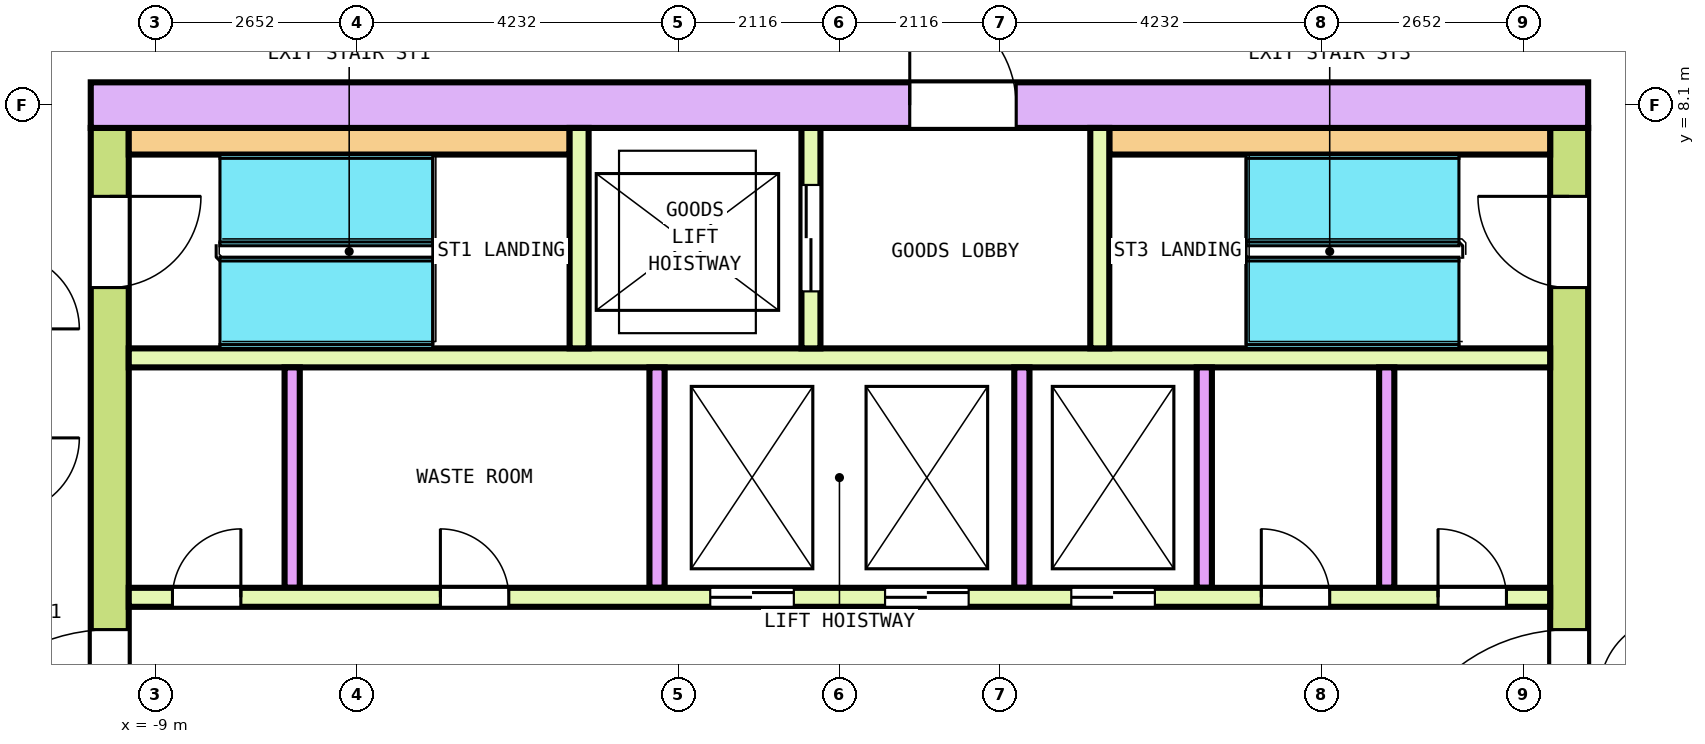
"""IFC4 building model, lengths in metres.
Left out: names, types, materials, properties, quantities, classifications, styles, units other than length and angle.
Written with IfcOpenShell. Run it as: python <this file> out.ifc"""

import sys

from ifc_helpers import new_model, si_unit, direction, frame, frame_2d, origin, place, context, subcontext, project, spatial, rectangle, extrude, element, fill, save


model = new_model("IFC4")
c1 = context("Model", 3, precision=1e-05, world=origin(), true_north=direction((0.0, 1.0)))
c2 = subcontext(c1, "Body", "Model", "MODEL_VIEW")
j1 = project(units=[si_unit("LENGTHUNIT", "METRE"), si_unit("PLANEANGLEUNIT", "RADIAN")], contexts=[c1])
p1 = place(None, origin())
s1 = spatial("IfcSite", under=j1, at=p1, CompositionType="ELEMENT")
p2 = place(p1, origin())
s2 = spatial("IfcBuilding", under=s1, at=p2, CompositionType="ELEMENT")
p3 = place(p2, frame((0.0, 0.0, 253.4)))
s3 = spatial("IfcBuildingStorey", under=s2, at=p3, CompositionType="ELEMENT", Elevation=253.4)
p4 = place(p3, frame((-9.85, 8.1, 0.0), z_axis=(0.0, 0.0, 1.0), x_axis=(1.0, 0.0, 0.0)))
e1 = element("IfcWall", 1, at=p4, inside=s3, PredefinedType="SHEAR", context=c2, shape_type="SweptSolid", body=[
    extrude(rectangle(XDim=19.7, YDim=0.6, at=frame_2d((9.85, 0.0))), origin(), (0.0, 0.0, 1.0), 3.7),
])
p5 = place(p4, frame((10.775, 0.0, 0.0)))
e2 = element("IfcOpeningElement", 2, at=p5, cuts=e1, PredefinedType="OPENING", context=c2, shape_type="SweptSolid", body=[
    extrude(rectangle(XDim=1.4, YDim=2.1, at=frame_2d((0.7, 1.05))), frame((0.0, 0.31, 0.0), z_axis=(0.0, -1.0, 0.0), x_axis=(1.0, 0.0, 0.0)), (0.0, 0.0, 1.0), 0.62),
])
p6 = place(p3, frame((-9.6, -7.8, 0.0), z_axis=(0.0, 0.0, 1.0), x_axis=(0.0, 1.0, 0.0)))
e3 = element("IfcWall", 3, at=p6, inside=s3, PredefinedType="SHEAR", context=c2, shape_type="SweptSolid", body=[
    extrude(rectangle(XDim=15.6, YDim=0.5, at=frame_2d((7.8, 0.0))), origin(), (0.0, 0.0, 1.0), 3.7),
])
p7 = place(p6, frame((6.6, 0.0, 0.0)))
e4 = element("IfcOpeningElement", 4, at=p7, cuts=e3, PredefinedType="OPENING", context=c2, shape_type="SweptSolid", body=[
    extrude(rectangle(XDim=2.4, YDim=2.1, at=frame_2d((1.2, 1.05))), frame((0.0, 0.26, 0.0), z_axis=(0.0, -1.0, 0.0), x_axis=(1.0, 0.0, 0.0)), (0.0, 0.0, 1.0), 0.52),
])
p8 = place(p6, frame((13.5, 0.0, 0.0)))
e5 = element("IfcOpeningElement", 5, at=p8, cuts=e3, PredefinedType="OPENING", context=c2, shape_type="SweptSolid", body=[
    extrude(rectangle(XDim=1.2, YDim=2.1, at=frame_2d((0.6, 1.05))), frame((0.0, 0.26, 0.0), z_axis=(0.0, -1.0, 0.0), x_axis=(1.0, 0.0, 0.0)), (0.0, 0.0, 1.0), 0.52),
])
p9 = place(p6, frame((0.9, 0.0, 0.0)))
e6 = element("IfcOpeningElement", 6, at=p9, cuts=e3, PredefinedType="OPENING", context=c2, shape_type="SweptSolid", body=[
    extrude(rectangle(XDim=1.2, YDim=2.1, at=frame_2d((0.6, 1.05))), frame((0.0, 0.26, 0.0), z_axis=(0.0, -1.0, 0.0), x_axis=(1.0, 0.0, 0.0)), (0.0, 0.0, 1.0), 0.52),
])
p10 = place(p3, frame((9.6, -7.8, 0.0), z_axis=(0.0, 0.0, 1.0), x_axis=(0.0, 1.0, 0.0)))
e7 = element("IfcWall", 7, at=p10, inside=s3, PredefinedType="SHEAR", context=c2, shape_type="SweptSolid", body=[
    extrude(rectangle(XDim=15.6, YDim=0.5, at=frame_2d((7.8, 0.0))), origin(), (0.0, 0.0, 1.0), 3.7),
])
p11 = place(p10, frame((6.6, 0.0, 0.0)))
e8 = element("IfcOpeningElement", 8, at=p11, cuts=e7, PredefinedType="OPENING", context=c2, shape_type="SweptSolid", body=[
    extrude(rectangle(XDim=2.4, YDim=2.1, at=frame_2d((1.2, 1.05))), frame((0.0, 0.26, 0.0), z_axis=(0.0, -1.0, 0.0), x_axis=(1.0, 0.0, 0.0)), (0.0, 0.0, 1.0), 0.52),
])
p12 = place(p10, frame((13.5, 0.0, 0.0)))
e9 = element("IfcOpeningElement", 9, at=p12, cuts=e7, PredefinedType="OPENING", context=c2, shape_type="SweptSolid", body=[
    extrude(rectangle(XDim=1.2, YDim=2.1, at=frame_2d((0.6, 1.05))), frame((0.0, 0.26, 0.0), z_axis=(0.0, -1.0, 0.0), x_axis=(1.0, 0.0, 0.0)), (0.0, 0.0, 1.0), 0.52),
])
p13 = place(p10, frame((1.0, 0.0, 0.0)))
e10 = element("IfcOpeningElement", 10, at=p13, cuts=e7, PredefinedType="OPENING", context=c2, shape_type="SweptSolid", body=[
    extrude(rectangle(XDim=1.0, YDim=2.1, at=frame_2d((0.5, 1.05))), frame((0.0, 0.26, 0.0), z_axis=(0.0, -1.0, 0.0), x_axis=(1.0, 0.0, 0.0)), (0.0, 0.0, 1.0), 0.52),
])
p14 = place(p3, frame((-9.35, 1.625, 0.0), z_axis=(0.0, 0.0, 1.0), x_axis=(1.0, 0.0, 0.0)))
e11 = element("IfcWall", 11, at=p14, inside=s3, PredefinedType="SOLIDWALL", context=c2, shape_type="SweptSolid", body=[
    extrude(rectangle(XDim=18.7, YDim=0.25, at=frame_2d((9.35, 0.0))), origin(), (0.0, 0.0, 1.0), 3.7),
])
p15 = place(p14, frame((7.65, 0.0, 0.0)))
e12 = element("IfcOpeningElement", 12, at=p15, cuts=e11, PredefinedType="OPENING", context=c2, shape_type="SweptSolid", body=[
    extrude(rectangle(XDim=1.1, YDim=2.1, at=frame_2d((0.55, 1.05))), frame((0.0, 0.135, 0.0), z_axis=(0.0, -1.0, 0.0), x_axis=(1.0, 0.0, 0.0)), (0.0, 0.0, 1.0), 0.27),
])
p16 = place(p14, frame((9.95, 0.0, 0.0)))
e13 = element("IfcOpeningElement", 13, at=p16, cuts=e11, PredefinedType="OPENING", context=c2, shape_type="SweptSolid", body=[
    extrude(rectangle(XDim=1.1, YDim=2.1, at=frame_2d((0.55, 1.05))), frame((0.0, 0.135, 0.0), z_axis=(0.0, -1.0, 0.0), x_axis=(1.0, 0.0, 0.0)), (0.0, 0.0, 1.0), 0.27),
])
p17 = place(p14, frame((12.4, 0.0, 0.0)))
e14 = element("IfcOpeningElement", 14, at=p17, cuts=e11, PredefinedType="OPENING", context=c2, shape_type="SweptSolid", body=[
    extrude(rectangle(XDim=1.1, YDim=2.1, at=frame_2d((0.55, 1.05))), frame((0.0, 0.135, 0.0), z_axis=(0.0, -1.0, 0.0), x_axis=(1.0, 0.0, 0.0)), (0.0, 0.0, 1.0), 0.27),
])
p18 = place(p14, frame((0.575, 0.0, 0.0)))
e15 = element("IfcOpeningElement", 15, at=p18, cuts=e11, PredefinedType="OPENING", context=c2, shape_type="SweptSolid", body=[
    extrude(rectangle(XDim=0.9, YDim=2.1, at=frame_2d((0.45, 1.05))), frame((0.0, 0.135, 0.0), z_axis=(0.0, -1.0, 0.0), x_axis=(1.0, 0.0, 0.0)), (0.0, 0.0, 1.0), 0.27),
])
p19 = place(p14, frame((4.1, 0.0, 0.0)))
e16 = element("IfcOpeningElement", 16, at=p19, cuts=e11, PredefinedType="OPENING", context=c2, shape_type="SweptSolid", body=[
    extrude(rectangle(XDim=0.9, YDim=2.1, at=frame_2d((0.45, 1.05))), frame((0.0, 0.135, 0.0), z_axis=(0.0, -1.0, 0.0), x_axis=(1.0, 0.0, 0.0)), (0.0, 0.0, 1.0), 0.27),
])
p20 = place(p14, frame((14.9, 0.0, 0.0)))
e17 = element("IfcOpeningElement", 17, at=p20, cuts=e11, PredefinedType="OPENING", context=c2, shape_type="SweptSolid", body=[
    extrude(rectangle(XDim=0.9, YDim=2.1, at=frame_2d((0.45, 1.05))), frame((0.0, 0.135, 0.0), z_axis=(0.0, -1.0, 0.0), x_axis=(1.0, 0.0, 0.0)), (0.0, 0.0, 1.0), 0.27),
])
p21 = place(p14, frame((17.225, 0.0, 0.0)))
e18 = element("IfcOpeningElement", 18, at=p21, cuts=e11, PredefinedType="OPENING", context=c2, shape_type="SweptSolid", body=[
    extrude(rectangle(XDim=0.9, YDim=2.1, at=frame_2d((0.45, 1.05))), frame((0.0, 0.135, 0.0), z_axis=(0.0, -1.0, 0.0), x_axis=(1.0, 0.0, 0.0)), (0.0, 0.0, 1.0), 0.27),
])
p22 = place(p3, frame((-9.35, 4.775, 0.0), z_axis=(0.0, 0.0, 1.0), x_axis=(1.0, 0.0, 0.0)))
e19 = element("IfcWall", 19, at=p22, inside=s3, PredefinedType="SOLIDWALL", context=c2, shape_type="SweptSolid", body=[
    extrude(rectangle(XDim=18.7, YDim=0.25, at=frame_2d((9.35, 0.0))), origin(), (0.0, 0.0, 1.0), 3.7),
])
for number, where, z_axis, x_axis in (
    (20, (-7.2, 1.75, 0.0), (0.0, 0.0, 1.0), (0.0, 1.0, 0.0)),
    (21, (-2.4, 1.75, 0.0), (0.0, 0.0, 1.0), (0.0, 1.0, 0.0)),
    (22, (2.4, 1.75, 0.0), (0.0, 0.0, 1.0), (0.0, 1.0, 0.0)),
    (23, (4.8, 1.75, 0.0), (0.0, 0.0, 1.0), (0.0, 1.0, 0.0)),
    (24, (7.2, 1.75, 0.0), (0.0, 0.0, 1.0), (0.0, 1.0, 0.0)),
):
    element("IfcWall", number, at=place(p3, frame(where, z_axis=z_axis, x_axis=x_axis)), inside=s3, PredefinedType="SOLIDWALL", context=c2, shape_type="SweptSolid", body=[
        extrude(rectangle(XDim=2.9, YDim=0.2, at=frame_2d((1.45, 0.0))), origin(), (0.0, 0.0, 1.0), 3.7),
    ])
for number, where, z_axis, x_axis in (
    (25, (-9.35, 7.625, 0.0), (0.0, 0.0, 1.0), (1.0, 0.0, 0.0)),
    (26, (3.55, 7.625, 0.0), (0.0, 0.0, 1.0), (1.0, 0.0, 0.0)),
):
    element("IfcWall", number, at=place(p3, frame(where, z_axis=z_axis, x_axis=x_axis)), inside=s3, PredefinedType="SOLIDWALL", context=c2, shape_type="SweptSolid", body=[
        extrude(rectangle(XDim=5.8, YDim=0.35, at=frame_2d((2.9, 0.0))), origin(), (0.0, 0.0, 1.0), 3.7),
    ])
p23 = place(p3, frame((-3.425, 4.9, 0.0), z_axis=(0.0, 0.0, 1.0), x_axis=(0.0, 1.0, 0.0)))
e27 = element("IfcWall", 27, at=p23, inside=s3, PredefinedType="SOLIDWALL", context=c2, shape_type="SweptSolid", body=[
    extrude(rectangle(XDim=2.9, YDim=0.25, at=frame_2d((1.45, 0.0))), origin(), (0.0, 0.0, 1.0), 3.7),
])
p24 = place(p3, frame((-0.375, 4.9, 0.0), z_axis=(0.0, 0.0, 1.0), x_axis=(0.0, 1.0, 0.0)))
e28 = element("IfcWall", 28, at=p24, inside=s3, PredefinedType="SOLIDWALL", context=c2, shape_type="SweptSolid", body=[
    extrude(rectangle(XDim=2.9, YDim=0.25, at=frame_2d((1.45, 0.0))), origin(), (0.0, 0.0, 1.0), 3.7),
])
p25 = place(p24, frame((0.75, 0.0, 0.0)))
e29 = element("IfcOpeningElement", 29, at=p25, cuts=e28, PredefinedType="OPENING", context=c2, shape_type="SweptSolid", body=[
    extrude(rectangle(XDim=1.4, YDim=2.1, at=frame_2d((0.7, 1.05))), frame((0.0, 0.135, 0.0), z_axis=(0.0, -1.0, 0.0), x_axis=(1.0, 0.0, 0.0)), (0.0, 0.0, 1.0), 0.27),
])
p26 = place(p3, frame((3.425, 4.9, 0.0), z_axis=(0.0, 0.0, 1.0), x_axis=(0.0, 1.0, 0.0)))
e30 = element("IfcWall", 30, at=p26, inside=s3, PredefinedType="SOLIDWALL", context=c2, shape_type="SweptSolid", body=[
    extrude(rectangle(XDim=2.9, YDim=0.25, at=frame_2d((1.45, 0.0))), origin(), (0.0, 0.0, 1.0), 3.7),
])
p27 = place(p15, origin())
e31 = element("IfcDoor", 31, at=p27, inside=s3, OperationType="DOUBLE_DOOR_SLIDING", PredefinedType="DOOR", context=c2, shape_type="SweptSolid", body=[
    extrude(rectangle(XDim=1.1, YDim=2.1, at=frame_2d((0.55, 1.05))), frame((0.0, 0.075, 0.0), z_axis=(0.0, -1.0, 0.0), x_axis=(1.0, 0.0, 0.0)), (0.0, 0.0, 1.0), 0.15),
])
fill(e12, e31)
p28 = place(p16, origin())
e32 = element("IfcDoor", 32, at=p28, inside=s3, OperationType="DOUBLE_DOOR_SLIDING", PredefinedType="DOOR", context=c2, shape_type="SweptSolid", body=[
    extrude(rectangle(XDim=1.1, YDim=2.1, at=frame_2d((0.55, 1.05))), frame((0.0, 0.075, 0.0), z_axis=(0.0, -1.0, 0.0), x_axis=(1.0, 0.0, 0.0)), (0.0, 0.0, 1.0), 0.15),
])
fill(e13, e32)
p29 = place(p17, origin())
e33 = element("IfcDoor", 33, at=p29, inside=s3, OperationType="DOUBLE_DOOR_SLIDING", PredefinedType="DOOR", context=c2, shape_type="SweptSolid", body=[
    extrude(rectangle(XDim=1.1, YDim=2.1, at=frame_2d((0.55, 1.05))), frame((0.0, 0.075, 0.0), z_axis=(0.0, -1.0, 0.0), x_axis=(1.0, 0.0, 0.0)), (0.0, 0.0, 1.0), 0.15),
])
fill(e14, e33)
p30 = place(p25, origin())
e34 = element("IfcDoor", 34, at=p30, inside=s3, OperationType="DOUBLE_DOOR_SLIDING", PredefinedType="DOOR", context=c2, shape_type="SweptSolid", body=[
    extrude(rectangle(XDim=1.4, YDim=2.1, at=frame_2d((0.7, 1.05))), frame((0.0, 0.075, 0.0), z_axis=(0.0, -1.0, 0.0), x_axis=(1.0, 0.0, 0.0)), (0.0, 0.0, 1.0), 0.15),
])
fill(e29, e34)
p31 = place(p7, origin())
e35 = element("IfcDoor", 35, at=p31, inside=s3, OperationType="DOUBLE_DOOR_SINGLE_SWING", PredefinedType="DOOR", context=c2, shape_type="SweptSolid", body=[
    extrude(rectangle(XDim=2.4, YDim=2.1, at=frame_2d((1.2, 1.05))), frame((0.0, 0.2, 0.0), z_axis=(0.0, -1.0, 0.0), x_axis=(1.0, 0.0, 0.0)), (0.0, 0.0, 1.0), 0.4),
])
fill(e4, e35)
p32 = place(p11, origin())
e36 = element("IfcDoor", 36, at=p32, inside=s3, OperationType="DOUBLE_DOOR_SINGLE_SWING", PredefinedType="DOOR", context=c2, shape_type="SweptSolid", body=[
    extrude(rectangle(XDim=2.4, YDim=2.1, at=frame_2d((1.2, 1.05))), frame((0.0, 0.2, 0.0), z_axis=(0.0, -1.0, 0.0), x_axis=(1.0, 0.0, 0.0)), (0.0, 0.0, 1.0), 0.4),
])
fill(e8, e36)
p33 = place(p8, origin())
e37 = element("IfcDoor", 37, at=p33, inside=s3, OperationType="SINGLE_SWING_RIGHT", PredefinedType="DOOR", context=c2, shape_type="SweptSolid", body=[
    extrude(rectangle(XDim=1.2, YDim=2.1, at=frame_2d((0.6, 1.05))), frame((0.0, 0.2, 0.0), z_axis=(0.0, -1.0, 0.0), x_axis=(1.0, 0.0, 0.0)), (0.0, 0.0, 1.0), 0.4),
])
fill(e5, e37)
p34 = place(p12, origin())
e38 = element("IfcDoor", 38, at=p34, inside=s3, OperationType="SINGLE_SWING_RIGHT", PredefinedType="DOOR", context=c2, shape_type="SweptSolid", body=[
    extrude(rectangle(XDim=1.2, YDim=2.1, at=frame_2d((0.6, 1.05))), frame((0.0, 0.2, 0.0), z_axis=(0.0, -1.0, 0.0), x_axis=(1.0, 0.0, 0.0)), (0.0, 0.0, 1.0), 0.4),
])
fill(e9, e38)
p35 = place(p5, origin())
e39 = element("IfcDoor", 39, at=p35, inside=s3, OperationType="DOUBLE_DOOR_SINGLE_SWING", PredefinedType="DOOR", context=c2, shape_type="SweptSolid", body=[
    extrude(rectangle(XDim=1.4, YDim=2.1, at=frame_2d((0.7, 1.05))), frame((0.0, 0.25, 0.0), z_axis=(0.0, -1.0, 0.0), x_axis=(1.0, 0.0, 0.0)), (0.0, 0.0, 1.0), 0.5),
])
fill(e2, e39)
p36 = place(p18, origin())
e40 = element("IfcDoor", 40, at=p36, inside=s3, OperationType="SINGLE_SWING_RIGHT", PredefinedType="DOOR", context=c2, shape_type="SweptSolid", body=[
    extrude(rectangle(XDim=0.9, YDim=2.1, at=frame_2d((0.45, 1.05))), frame((0.0, 0.075, 0.0), z_axis=(0.0, -1.0, 0.0), x_axis=(1.0, 0.0, 0.0)), (0.0, 0.0, 1.0), 0.15),
])
fill(e15, e40)
p37 = place(p19, origin())
e41 = element("IfcDoor", 41, at=p37, inside=s3, OperationType="SINGLE_SWING_LEFT", PredefinedType="DOOR", context=c2, shape_type="SweptSolid", body=[
    extrude(rectangle(XDim=0.9, YDim=2.1, at=frame_2d((0.45, 1.05))), frame((0.0, 0.075, 0.0), z_axis=(0.0, -1.0, 0.0), x_axis=(1.0, 0.0, 0.0)), (0.0, 0.0, 1.0), 0.15),
])
fill(e16, e41)
p38 = place(p20, origin())
e42 = element("IfcDoor", 42, at=p38, inside=s3, OperationType="SINGLE_SWING_RIGHT", PredefinedType="DOOR", context=c2, shape_type="SweptSolid", body=[
    extrude(rectangle(XDim=0.9, YDim=2.1, at=frame_2d((0.45, 1.05))), frame((0.0, 0.075, 0.0), z_axis=(0.0, -1.0, 0.0), x_axis=(1.0, 0.0, 0.0)), (0.0, 0.0, 1.0), 0.15),
])
fill(e17, e42)
p39 = place(p21, origin())
e43 = element("IfcDoor", 43, at=p39, inside=s3, OperationType="SINGLE_SWING_LEFT", PredefinedType="DOOR", context=c2, shape_type="SweptSolid", body=[
    extrude(rectangle(XDim=0.9, YDim=2.1, at=frame_2d((0.45, 1.05))), frame((0.0, 0.075, 0.0), z_axis=(0.0, -1.0, 0.0), x_axis=(1.0, 0.0, 0.0)), (0.0, 0.0, 1.0), 0.15),
])
fill(e18, e43)
save(model, sys.argv[1])
